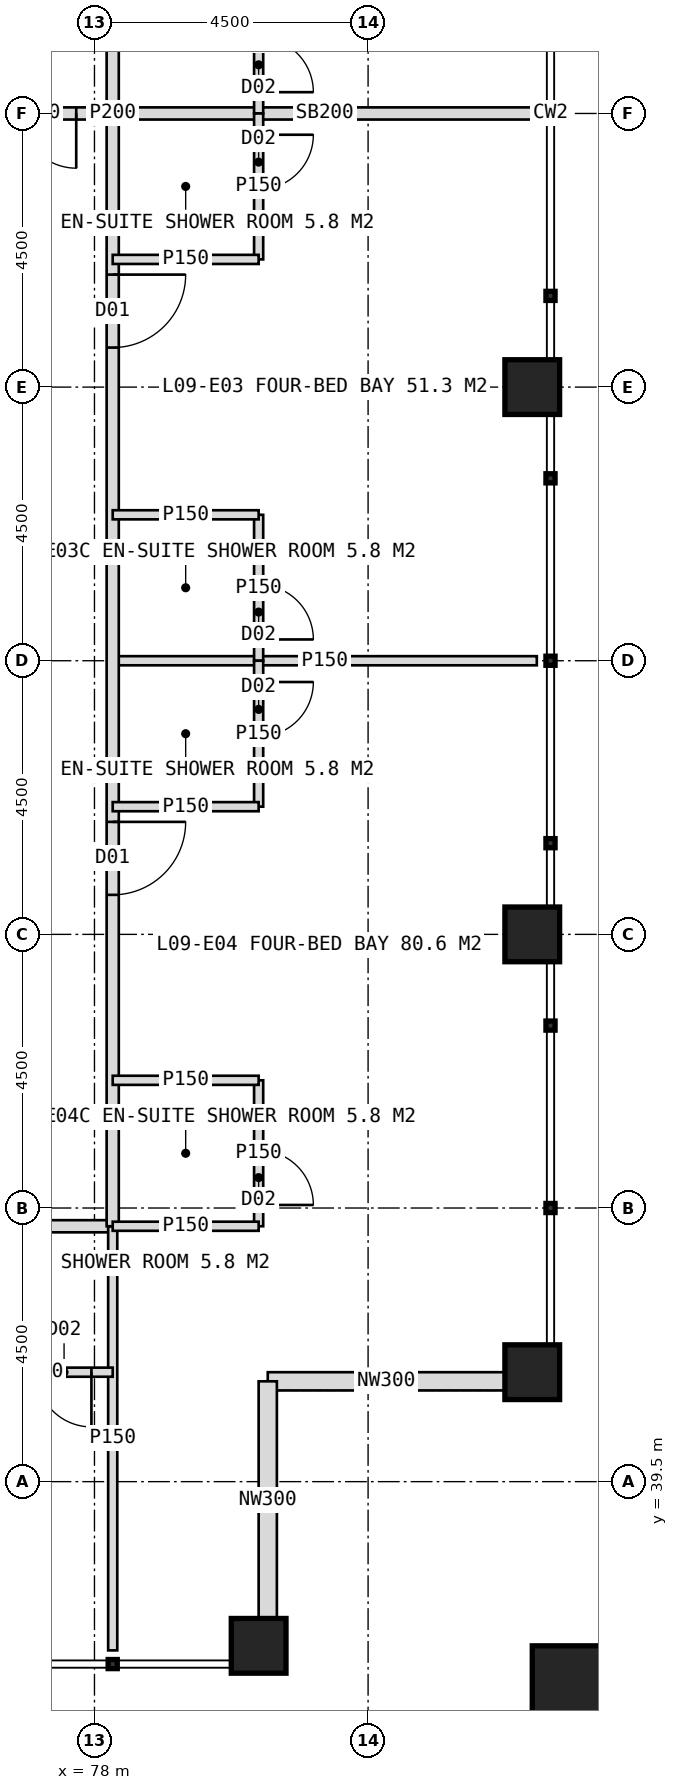
"""IFC4 building model, lengths in metres.
Left out: names, types, materials, properties, quantities, classifications, styles, units other than length and angle.
Written with IfcOpenShell. Run it as: python <this file> out.ifc"""

import sys

from ifc_helpers import new_model, si_unit, direction, frame, frame_2d, origin, origin_2d, place, context, subcontext, project, spatial, rectangle, hollow_rectangle, extrude, element, fill, save


model = new_model("IFC4")
c1 = context("Model", 3, precision=1e-05, world=origin(), true_north=direction((0.0, 1.0)))
c2 = subcontext(c1, "Body", "Model", "MODEL_VIEW")
j1 = project(units=[si_unit("LENGTHUNIT", "METRE"), si_unit("PLANEANGLEUNIT", "RADIAN")], contexts=[c1])
p1 = place(None, origin())
s1 = spatial("IfcSite", under=j1, at=p1, CompositionType="ELEMENT")
p2 = place(p1, origin())
s2 = spatial("IfcBuilding", under=s1, at=p2, CompositionType="ELEMENT")
p3 = place(p2, frame((0.0, 0.0, 43.0)))
s3 = spatial("IfcBuildingStorey", under=s2, at=p3, CompositionType="ELEMENT", Elevation=43.0)
for number, where, z_axis, x_axis in (
    (1, (85.2, 41.3, 0.0), (0.0, 0.0, 1.0), (1.0, 0.0, 0.0)),
    (2, (85.2, 48.5, 0.0), (0.0, 0.0, 1.0), (1.0, 0.0, 0.0)),
    (3, (85.2, 57.5, 0.0), (0.0, 0.0, 1.0), (1.0, 0.0, 0.0)),
    (4, (80.7, 36.8, 0.0), (0.0, 0.0, 1.0), (1.0, 0.0, 0.0)),
):
    element("IfcColumn", number, at=place(p3, frame(where, z_axis=z_axis, x_axis=x_axis)), inside=s3, PredefinedType="COLUMN", context=c2, shape_type="SweptSolid", body=[
        extrude(hollow_rectangle(XDim=0.9, YDim=0.9, WallThickness=0.08, at=origin_2d()), origin(), (0.0, 0.0, 1.0), 4.0),
    ])
p4 = place(p3, frame((86.1, 35.9, 0.0), z_axis=(0.0, 0.0, 1.0), x_axis=(1.0, 0.0, 0.0)))
e5 = element("IfcColumn", 5, at=p4, inside=s3, PredefinedType="COLUMN", context=c2, shape_type="SweptSolid", body=[
    extrude(hollow_rectangle(XDim=1.8, YDim=1.8, WallThickness=0.1, at=origin_2d()), origin(), (0.0, 0.0, 1.0), 4.0),
])
for number, where, z_axis, x_axis in (
    (6, (84.75, 41.15, 0.0), (0.0, 0.0, 1.0), (-1.0, 0.0, 0.0)),
    (7, (80.85, 41.15, 0.0), (0.0, 0.0, 1.0), (0.0, -1.0, 0.0)),
):
    element("IfcWall", number, at=place(p3, frame(where, z_axis=z_axis, x_axis=x_axis)), inside=s3, PredefinedType="ELEMENTEDWALL", context=c2, shape_type="SweptSolid", body=[
        extrude(rectangle(XDim=3.9, YDim=0.3, at=frame_2d((1.95, 0.0))), origin(), (0.0, 0.0, 1.0), 2.95),
    ])
p5 = place(p3, frame((78.3, 43.7, 0.0), z_axis=(0.0, 0.0, 1.0), x_axis=(-1.0, 0.0, 0.0)))
e8 = element("IfcWall", 8, at=p5, inside=s3, PredefinedType="PARTITIONING", context=c2, shape_type="SweptSolid", body=[
    extrude(rectangle(XDim=36.6, YDim=0.2, at=frame_2d((18.3, 0.0))), origin(), (0.0, 0.0, 1.0), 3.75),
])
p6 = place(p5, frame((2.65, 0.0, 0.0)))
e9 = element("IfcOpeningElement", 9, at=p6, cuts=e8, PredefinedType="OPENING", context=c2, shape_type="SweptSolid", body=[
    extrude(rectangle(XDim=1.2, YDim=2.2, at=frame_2d((0.6, 1.1))), frame((0.0, 0.11, 0.0), z_axis=(0.0, -1.0, 0.0), x_axis=(1.0, 0.0, 0.0)), (0.0, 0.0, 1.0), 0.22),
])
p7 = place(p5, frame((11.95, 0.0, 0.0)))
e10 = element("IfcOpeningElement", 10, at=p7, cuts=e8, PredefinedType="OPENING", context=c2, shape_type="SweptSolid", body=[
    extrude(rectangle(XDim=1.2, YDim=2.2, at=frame_2d((0.6, 1.1))), frame((0.0, 0.11, 0.0), z_axis=(0.0, -1.0, 0.0), x_axis=(1.0, 0.0, 0.0)), (0.0, 0.0, 1.0), 0.22),
])
p8 = place(p5, frame((20.95, 0.0, 0.0)))
e11 = element("IfcOpeningElement", 11, at=p8, cuts=e8, PredefinedType="OPENING", context=c2, shape_type="SweptSolid", body=[
    extrude(rectangle(XDim=1.2, YDim=2.2, at=frame_2d((0.6, 1.1))), frame((0.0, 0.11, 0.0), z_axis=(0.0, -1.0, 0.0), x_axis=(1.0, 0.0, 0.0)), (0.0, 0.0, 1.0), 0.22),
])
p9 = place(p5, frame((29.95, 0.0, 0.0)))
e12 = element("IfcOpeningElement", 12, at=p9, cuts=e8, PredefinedType="OPENING", context=c2, shape_type="SweptSolid", body=[
    extrude(rectangle(XDim=1.2, YDim=2.2, at=frame_2d((0.6, 1.1))), frame((0.0, 0.11, 0.0), z_axis=(0.0, -1.0, 0.0), x_axis=(1.0, 0.0, 0.0)), (0.0, 0.0, 1.0), 0.22),
])
p10 = place(p3, frame((78.3, 43.7, 0.0), z_axis=(0.0, 0.0, 1.0), x_axis=(0.0, -1.0, 0.0)))
e13 = element("IfcWall", 13, at=p10, inside=s3, PredefinedType="PARTITIONING", context=c2, shape_type="SweptSolid", body=[
    extrude(rectangle(XDim=6.975, YDim=0.15, at=frame_2d((3.487, 0.0))), origin(), (0.0, 0.0, 1.0), 3.75),
])
p11 = place(p3, frame((78.3, 41.3, 0.0), z_axis=(0.0, 0.0, 1.0), x_axis=(-1.0, 0.0, 0.0)))
e14 = element("IfcWall", 14, at=p11, inside=s3, PredefinedType="PARTITIONING", context=c2, shape_type="SweptSolid", body=[
    extrude(rectangle(XDim=2.4, YDim=0.15, at=frame_2d((1.2, 0.0))), origin(), (0.0, 0.0, 1.0), 2.95),
])
p12 = place(p11, frame((0.35, 0.0, 0.0)))
e15 = element("IfcOpeningElement", 15, at=p12, cuts=e14, PredefinedType="OPENING", context=c2, shape_type="SweptSolid", body=[
    extrude(rectangle(XDim=0.9, YDim=2.1, at=frame_2d((0.45, 1.05))), frame((0.0, 0.085, 0.0), z_axis=(0.0, -1.0, 0.0), x_axis=(1.0, 0.0, 0.0)), (0.0, 0.0, 1.0), 0.17),
])
p13 = place(p3, frame((78.3, 62.0, 0.0), z_axis=(0.0, 0.0, 1.0), x_axis=(1.0, 0.0, 0.0)))
e16 = element("IfcWall", 16, at=p13, inside=s3, PredefinedType="SOLIDWALL", context=c2, shape_type="SweptSolid", body=[
    extrude(rectangle(XDim=6.975, YDim=0.2, at=frame_2d((3.487, 0.0))), origin(), (0.0, 0.0, 1.0), 2.75),
])
p14 = place(p3, frame((78.3, 53.0, 0.0), z_axis=(0.0, 0.0, 1.0), x_axis=(1.0, 0.0, 0.0)))
e17 = element("IfcWall", 17, at=p14, inside=s3, PredefinedType="PARTITIONING", context=c2, shape_type="SweptSolid", body=[
    extrude(rectangle(XDim=6.975, YDim=0.15, at=frame_2d((3.487, 0.0))), origin(), (0.0, 0.0, 1.0), 3.75),
])
p15 = place(p3, frame((78.3, 80.3, 0.0), z_axis=(0.0, 0.0, 1.0), x_axis=(0.0, -1.0, 0.0)))
e18 = element("IfcWall", 18, at=p15, inside=s3, PredefinedType="PARTITIONING", context=c2, shape_type="SweptSolid", body=[
    extrude(rectangle(XDim=36.6, YDim=0.2, at=frame_2d((18.3, 0.0))), origin(), (0.0, 0.0, 1.0), 3.75),
])
p16 = place(p15, frame((2.65, 0.0, 0.0)))
e19 = element("IfcOpeningElement", 19, at=p16, cuts=e18, PredefinedType="OPENING", context=c2, shape_type="SweptSolid", body=[
    extrude(rectangle(XDim=1.2, YDim=2.2, at=frame_2d((0.6, 1.1))), frame((0.0, 0.11, 0.0), z_axis=(0.0, -1.0, 0.0), x_axis=(1.0, 0.0, 0.0)), (0.0, 0.0, 1.0), 0.22),
])
p17 = place(p15, frame((11.95, 0.0, 0.0)))
e20 = element("IfcOpeningElement", 20, at=p17, cuts=e18, PredefinedType="OPENING", context=c2, shape_type="SweptSolid", body=[
    extrude(rectangle(XDim=1.2, YDim=2.2, at=frame_2d((0.6, 1.1))), frame((0.0, 0.11, 0.0), z_axis=(0.0, -1.0, 0.0), x_axis=(1.0, 0.0, 0.0)), (0.0, 0.0, 1.0), 0.22),
])
p18 = place(p15, frame((20.95, 0.0, 0.0)))
e21 = element("IfcOpeningElement", 21, at=p18, cuts=e18, PredefinedType="OPENING", context=c2, shape_type="SweptSolid", body=[
    extrude(rectangle(XDim=1.2, YDim=2.2, at=frame_2d((0.6, 1.1))), frame((0.0, 0.11, 0.0), z_axis=(0.0, -1.0, 0.0), x_axis=(1.0, 0.0, 0.0)), (0.0, 0.0, 1.0), 0.22),
])
p19 = place(p15, frame((29.95, 0.0, 0.0)))
e22 = element("IfcOpeningElement", 22, at=p19, cuts=e18, PredefinedType="OPENING", context=c2, shape_type="SweptSolid", body=[
    extrude(rectangle(XDim=1.2, YDim=2.2, at=frame_2d((0.6, 1.1))), frame((0.0, 0.11, 0.0), z_axis=(0.0, -1.0, 0.0), x_axis=(1.0, 0.0, 0.0)), (0.0, 0.0, 1.0), 0.22),
])
p20 = place(p3, frame((80.7, 64.4, 0.0), z_axis=(0.0, 0.0, 1.0), x_axis=(0.0, -1.0, 0.0)))
e23 = element("IfcWall", 23, at=p20, inside=s3, PredefinedType="PARTITIONING", context=c2, shape_type="SweptSolid", body=[
    extrude(rectangle(XDim=2.4, YDim=0.15, at=frame_2d((1.2, 0.0))), origin(), (0.0, 0.0, 1.0), 3.75),
])
p21 = place(p20, frame((1.15, 0.0, 0.0)))
e24 = element("IfcOpeningElement", 24, at=p21, cuts=e23, PredefinedType="OPENING", context=c2, shape_type="SweptSolid", body=[
    extrude(rectangle(XDim=0.9, YDim=2.1, at=frame_2d((0.45, 1.05))), frame((0.0, 0.085, 0.0), z_axis=(0.0, -1.0, 0.0), x_axis=(1.0, 0.0, 0.0)), (0.0, 0.0, 1.0), 0.17),
])
p22 = place(p3, frame((80.7, 62.0, 0.0), z_axis=(0.0, 0.0, 1.0), x_axis=(0.0, -1.0, 0.0)))
e25 = element("IfcWall", 25, at=p22, inside=s3, PredefinedType="PARTITIONING", context=c2, shape_type="SweptSolid", body=[
    extrude(rectangle(XDim=2.4, YDim=0.15, at=frame_2d((1.2, 0.0))), origin(), (0.0, 0.0, 1.0), 3.75),
])
p23 = place(p22, frame((0.35, 0.0, 0.0)))
e26 = element("IfcOpeningElement", 26, at=p23, cuts=e25, PredefinedType="OPENING", context=c2, shape_type="SweptSolid", body=[
    extrude(rectangle(XDim=0.9, YDim=2.1, at=frame_2d((0.45, 1.05))), frame((0.0, 0.085, 0.0), z_axis=(0.0, -1.0, 0.0), x_axis=(1.0, 0.0, 0.0)), (0.0, 0.0, 1.0), 0.17),
])
p24 = place(p3, frame((78.3, 59.6, 0.0), z_axis=(0.0, 0.0, 1.0), x_axis=(1.0, 0.0, 0.0)))
e27 = element("IfcWall", 27, at=p24, inside=s3, PredefinedType="PARTITIONING", context=c2, shape_type="SweptSolid", body=[
    extrude(rectangle(XDim=2.4, YDim=0.15, at=frame_2d((1.2, 0.0))), origin(), (0.0, 0.0, 1.0), 3.75),
])
p25 = place(p3, frame((80.7, 55.4, 0.0), z_axis=(0.0, 0.0, 1.0), x_axis=(0.0, -1.0, 0.0)))
e28 = element("IfcWall", 28, at=p25, inside=s3, PredefinedType="PARTITIONING", context=c2, shape_type="SweptSolid", body=[
    extrude(rectangle(XDim=2.4, YDim=0.15, at=frame_2d((1.2, 0.0))), origin(), (0.0, 0.0, 1.0), 3.75),
])
p26 = place(p25, frame((1.15, 0.0, 0.0)))
e29 = element("IfcOpeningElement", 29, at=p26, cuts=e28, PredefinedType="OPENING", context=c2, shape_type="SweptSolid", body=[
    extrude(rectangle(XDim=0.9, YDim=2.1, at=frame_2d((0.45, 1.05))), frame((0.0, 0.085, 0.0), z_axis=(0.0, -1.0, 0.0), x_axis=(1.0, 0.0, 0.0)), (0.0, 0.0, 1.0), 0.17),
])
p27 = place(p3, frame((78.3, 55.4, 0.0), z_axis=(0.0, 0.0, 1.0), x_axis=(1.0, 0.0, 0.0)))
e30 = element("IfcWall", 30, at=p27, inside=s3, PredefinedType="PARTITIONING", context=c2, shape_type="SweptSolid", body=[
    extrude(rectangle(XDim=2.4, YDim=0.15, at=frame_2d((1.2, 0.0))), origin(), (0.0, 0.0, 1.0), 3.75),
])
p28 = place(p3, frame((80.7, 53.0, 0.0), z_axis=(0.0, 0.0, 1.0), x_axis=(0.0, -1.0, 0.0)))
e31 = element("IfcWall", 31, at=p28, inside=s3, PredefinedType="PARTITIONING", context=c2, shape_type="SweptSolid", body=[
    extrude(rectangle(XDim=2.4, YDim=0.15, at=frame_2d((1.2, 0.0))), origin(), (0.0, 0.0, 1.0), 3.75),
])
p29 = place(p28, frame((0.35, 0.0, 0.0)))
e32 = element("IfcOpeningElement", 32, at=p29, cuts=e31, PredefinedType="OPENING", context=c2, shape_type="SweptSolid", body=[
    extrude(rectangle(XDim=0.9, YDim=2.1, at=frame_2d((0.45, 1.05))), frame((0.0, 0.085, 0.0), z_axis=(0.0, -1.0, 0.0), x_axis=(1.0, 0.0, 0.0)), (0.0, 0.0, 1.0), 0.17),
])
p30 = place(p3, frame((78.3, 50.6, 0.0), z_axis=(0.0, 0.0, 1.0), x_axis=(1.0, 0.0, 0.0)))
e33 = element("IfcWall", 33, at=p30, inside=s3, PredefinedType="PARTITIONING", context=c2, shape_type="SweptSolid", body=[
    extrude(rectangle(XDim=2.4, YDim=0.15, at=frame_2d((1.2, 0.0))), origin(), (0.0, 0.0, 1.0), 3.75),
])
p31 = place(p3, frame((80.7, 46.1, 0.0), z_axis=(0.0, 0.0, 1.0), x_axis=(0.0, -1.0, 0.0)))
e34 = element("IfcWall", 34, at=p31, inside=s3, PredefinedType="PARTITIONING", context=c2, shape_type="SweptSolid", body=[
    extrude(rectangle(XDim=2.4, YDim=0.15, at=frame_2d((1.2, 0.0))), origin(), (0.0, 0.0, 1.0), 2.95),
])
p32 = place(p31, frame((1.15, 0.0, 0.0)))
e35 = element("IfcOpeningElement", 35, at=p32, cuts=e34, PredefinedType="OPENING", context=c2, shape_type="SweptSolid", body=[
    extrude(rectangle(XDim=0.9, YDim=2.1, at=frame_2d((0.45, 1.05))), frame((0.0, 0.085, 0.0), z_axis=(0.0, -1.0, 0.0), x_axis=(1.0, 0.0, 0.0)), (0.0, 0.0, 1.0), 0.17),
])
for number, where, z_axis, x_axis in (
    (36, (78.3, 46.1, 0.0), (0.0, 0.0, 1.0), (1.0, 0.0, 0.0)),
    (37, (78.3, 43.7, 0.0), (0.0, 0.0, 1.0), (1.0, 0.0, 0.0)),
):
    element("IfcWall", number, at=place(p3, frame(where, z_axis=z_axis, x_axis=x_axis)), inside=s3, PredefinedType="PARTITIONING", context=c2, shape_type="SweptSolid", body=[
        extrude(rectangle(XDim=2.4, YDim=0.15, at=frame_2d((1.2, 0.0))), origin(), (0.0, 0.0, 1.0), 3.75),
    ])
p33 = place(p3, frame((75.6, 62.0, 0.0), z_axis=(0.0, 0.0, 1.0), x_axis=(1.0, 0.0, 0.0)))
e38 = element("IfcWall", 38, at=p33, inside=s3, PredefinedType="SOLIDWALL", context=c2, shape_type="SweptSolid", body=[
    extrude(rectangle(XDim=2.7, YDim=0.2, at=frame_2d((1.35, 0.0))), origin(), (0.0, 0.0, 1.0), 2.75),
])
p34 = place(p33, frame((0.3, 0.0, 0.0)))
e39 = element("IfcOpeningElement", 39, at=p34, cuts=e38, PredefinedType="OPENING", context=c2, shape_type="SweptSolid", body=[
    extrude(rectangle(XDim=1.8, YDim=2.2, at=frame_2d((0.9, 1.1))), frame((0.0, 0.11, 0.0), z_axis=(0.0, -1.0, 0.0), x_axis=(1.0, 0.0, 0.0)), (0.0, 0.0, 1.0), 0.22),
])
p35 = place(p12, origin())
e40 = element("IfcDoor", 40, at=p35, inside=s3, OperationType="SINGLE_SWING_LEFT", PredefinedType="DOOR", context=c2, shape_type="SweptSolid", body=[
    extrude(rectangle(XDim=0.9, YDim=2.1, at=frame_2d((0.45, 1.05))), frame((0.0, 0.025, 0.0), z_axis=(0.0, -1.0, 0.0), x_axis=(1.0, 0.0, 0.0)), (0.0, 0.0, 1.0), 0.05),
])
fill(e15, e40)
p36 = place(p21, origin())
e41 = element("IfcDoor", 41, at=p36, inside=s3, OperationType="SINGLE_SWING_RIGHT", PredefinedType="DOOR", context=c2, shape_type="SweptSolid", body=[
    extrude(rectangle(XDim=0.9, YDim=2.1, at=frame_2d((0.45, 1.05))), frame((0.0, 0.025, 0.0), z_axis=(0.0, -1.0, 0.0), x_axis=(1.0, 0.0, 0.0)), (0.0, 0.0, 1.0), 0.05),
])
fill(e24, e41)
p37 = place(p18, origin())
e42 = element("IfcDoor", 42, at=p37, inside=s3, OperationType="SINGLE_SWING_LEFT", PredefinedType="DOOR", context=c2, shape_type="SweptSolid", body=[
    extrude(rectangle(XDim=1.2, YDim=2.2, at=frame_2d((0.6, 1.1))), frame((0.0, 0.025, 0.0), z_axis=(0.0, -1.0, 0.0), x_axis=(1.0, 0.0, 0.0)), (0.0, 0.0, 1.0), 0.05),
])
fill(e21, e42)
p38 = place(p23, origin())
e43 = element("IfcDoor", 43, at=p38, inside=s3, OperationType="SINGLE_SWING_LEFT", PredefinedType="DOOR", context=c2, shape_type="SweptSolid", body=[
    extrude(rectangle(XDim=0.9, YDim=2.1, at=frame_2d((0.45, 1.05))), frame((0.0, 0.025, 0.0), z_axis=(0.0, -1.0, 0.0), x_axis=(1.0, 0.0, 0.0)), (0.0, 0.0, 1.0), 0.05),
])
fill(e26, e43)
p39 = place(p26, origin())
e44 = element("IfcDoor", 44, at=p39, inside=s3, OperationType="SINGLE_SWING_RIGHT", PredefinedType="DOOR", context=c2, shape_type="SweptSolid", body=[
    extrude(rectangle(XDim=0.9, YDim=2.1, at=frame_2d((0.45, 1.05))), frame((0.0, 0.025, 0.0), z_axis=(0.0, -1.0, 0.0), x_axis=(1.0, 0.0, 0.0)), (0.0, 0.0, 1.0), 0.05),
])
fill(e29, e44)
p40 = place(p19, origin())
e45 = element("IfcDoor", 45, at=p40, inside=s3, OperationType="SINGLE_SWING_LEFT", PredefinedType="DOOR", context=c2, shape_type="SweptSolid", body=[
    extrude(rectangle(XDim=1.2, YDim=2.2, at=frame_2d((0.6, 1.1))), frame((0.0, 0.025, 0.0), z_axis=(0.0, -1.0, 0.0), x_axis=(1.0, 0.0, 0.0)), (0.0, 0.0, 1.0), 0.05),
])
fill(e22, e45)
p41 = place(p29, origin())
e46 = element("IfcDoor", 46, at=p41, inside=s3, OperationType="SINGLE_SWING_LEFT", PredefinedType="DOOR", context=c2, shape_type="SweptSolid", body=[
    extrude(rectangle(XDim=0.9, YDim=2.1, at=frame_2d((0.45, 1.05))), frame((0.0, 0.025, 0.0), z_axis=(0.0, -1.0, 0.0), x_axis=(1.0, 0.0, 0.0)), (0.0, 0.0, 1.0), 0.05),
])
fill(e32, e46)
p42 = place(p32, origin())
e47 = element("IfcDoor", 47, at=p42, inside=s3, OperationType="SINGLE_SWING_RIGHT", PredefinedType="DOOR", context=c2, shape_type="SweptSolid", body=[
    extrude(rectangle(XDim=0.9, YDim=2.1, at=frame_2d((0.45, 1.05))), frame((0.0, 0.025, 0.0), z_axis=(0.0, -1.0, 0.0), x_axis=(1.0, 0.0, 0.0)), (0.0, 0.0, 1.0), 0.05),
])
fill(e35, e47)
p43 = place(p34, origin())
e48 = element("IfcDoor", 48, at=p43, inside=s3, OperationType="DOUBLE_DOOR_DOUBLE_SWING", PredefinedType="DOOR", context=c2, shape_type="SweptSolid", body=[
    extrude(rectangle(XDim=1.8, YDim=2.2, at=frame_2d((0.9, 1.1))), frame((0.0, 0.025, 0.0), z_axis=(0.0, -1.0, 0.0), x_axis=(1.0, 0.0, 0.0)), (0.0, 0.0, 1.0), 0.05),
])
fill(e39, e48)
save(model, sys.argv[1])
